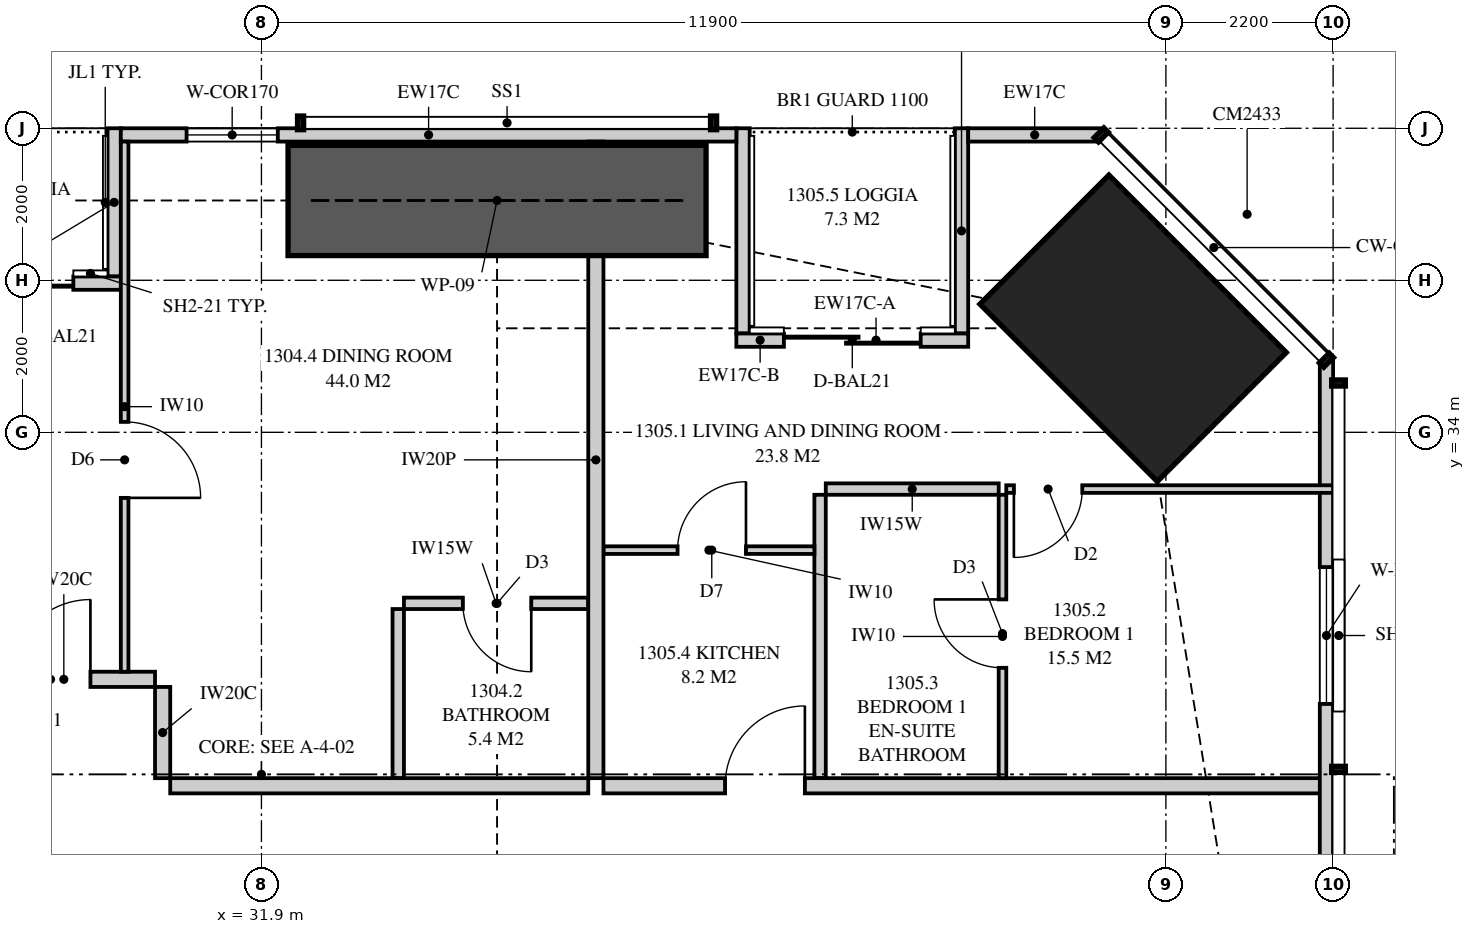
"""IFC4 building model, lengths in metres.
Left out: names, types, materials, properties, quantities, classifications, styles, units other than length and angle.
Written with IfcOpenShell. Run it as: python <this file> out.ifc"""

import sys

from ifc_helpers import new_model, si_unit, direction, frame, frame_2d, origin, origin_2d, place, context, subcontext, project, spatial, polyline, rectangle, outline, extrude, element, fill, save


model = new_model("IFC4")
c1 = context("Model", 3, precision=1e-05, world=origin(), true_north=direction((0.0, 1.0)))
c2 = subcontext(c1, "Body", "Model", "MODEL_VIEW")
j1 = project(units=[si_unit("LENGTHUNIT", "METRE"), si_unit("PLANEANGLEUNIT", "RADIAN")], contexts=[c1])
p1 = place(None, origin())
s1 = spatial("IfcSite", under=j1, at=p1, CompositionType="ELEMENT")
p2 = place(p1, origin())
s2 = spatial("IfcBuilding", under=s1, at=p2, CompositionType="ELEMENT")
p3 = place(p2, frame((0.0, 0.0, 51.15)))
s3 = spatial("IfcBuildingStorey", under=s2, at=p3, CompositionType="ELEMENT", Elevation=51.15)
p4 = place(p3, frame((43.369, 35.369, 0.0), z_axis=(0.0, 0.0, 1.0), x_axis=(-0.707106781187, -0.707106781187, 0.0)))
e1 = element("IfcColumn", 1, at=p4, inside=s3, PredefinedType="COLUMN", context=c2, shape_type="SweptSolid", body=[
    extrude(rectangle(XDim=2.4, YDim=3.3, at=origin_2d()), origin(), (0.0, 0.0, 1.0), 3.35),
])
p5 = place(p3, frame((45.913, 3.051, 0.0), z_axis=(0.0, 0.0, 1.0), x_axis=(0.0, 1.0, 0.0)))
e2 = element("IfcWall", 2, at=p5, inside=s3, PredefinedType="SOLIDWALL", context=c2, shape_type="SweptSolid", body=[
    extrude(outline(polyline([(0.0, 0.0), (31.897, 0.0), (31.897, 3.11), (22.167, 3.11), (22.167, 2.15), (22.074, 2.15), (22.074, 3.11), (21.949, 3.11), (21.949, 2.15), (9.949, 2.15), (9.949, 3.11), (9.823, 3.11), (9.823, 2.15), (9.73, 2.15), (9.73, 3.11), (0.0, 3.11), (0.0, 0.0)])), frame((0.0, 0.087, 0.0), z_axis=(0.0, -1.0, 0.0), x_axis=(1.0, 0.0, 0.0)), (0.0, 0.0, 1.0), 0.175),
])
p6 = place(p5, frame((2.222, 0.0, 0.4)))
e3 = element("IfcOpeningElement", 3, at=p6, cuts=e2, PredefinedType="OPENING", context=c2, shape_type="SweptSolid", body=[
    extrude(rectangle(XDim=1.8, YDim=1.7, at=frame_2d((0.9, 0.85))), frame((0.0, 0.097, 0.0), z_axis=(0.0, -1.0, 0.0), x_axis=(1.0, 0.0, 0.0)), (0.0, 0.0, 1.0), 0.195),
])
p7 = place(p5, frame((14.849, 0.0, 0.4)))
e4 = element("IfcOpeningElement", 4, at=p7, cuts=e2, PredefinedType="OPENING", context=c2, shape_type="SweptSolid", body=[
    extrude(rectangle(XDim=1.2, YDim=1.7, at=frame_2d((0.6, 0.85))), frame((0.0, 0.097, 0.0), z_axis=(0.0, -1.0, 0.0), x_axis=(1.0, 0.0, 0.0)), (0.0, 0.0, 1.0), 0.195),
])
p8 = place(p5, frame((27.375, 0.0, 0.4)))
e5 = element("IfcOpeningElement", 5, at=p8, cuts=e2, PredefinedType="OPENING", context=c2, shape_type="SweptSolid", body=[
    extrude(rectangle(XDim=1.8, YDim=1.7, at=frame_2d((0.9, 0.85))), frame((0.0, 0.097, 0.0), z_axis=(0.0, -1.0, 0.0), x_axis=(1.0, 0.0, 0.0)), (0.0, 0.0, 1.0), 0.195),
])
p9 = place(p3, frame((42.949, 37.913, 0.0), z_axis=(0.0, 0.0, 1.0), x_axis=(-1.0, 0.0, 0.0)))
e6 = element("IfcWall", 6, at=p9, inside=s3, PredefinedType="SOLIDWALL", context=c2, shape_type="SweptSolid", body=[
    extrude(rectangle(XDim=1.75, YDim=0.175, at=frame_2d((0.875, 0.0))), origin(), (0.0, 0.0, 1.0), 3.11),
])
p10 = place(p3, frame((38.149, 37.913, 0.0), z_axis=(0.0, 0.0, 1.0), x_axis=(-1.0, 0.0, 0.0)))
e7 = element("IfcWall", 7, at=p10, inside=s3, PredefinedType="SOLIDWALL", context=c2, shape_type="SweptSolid", body=[
    extrude(outline(polyline([(0.0, 0.0), (8.099, 0.0), (8.099, 2.15), (3.149, 2.15), (3.149, 3.11), (2.993, 3.11), (2.993, 2.15), (2.945, 2.15), (2.945, 3.11), (0.0, 3.11), (0.0, 0.0)])), frame((0.0, 0.087, 0.0), z_axis=(0.0, -1.0, 0.0), x_axis=(1.0, 0.0, 0.0)), (0.0, 0.0, 1.0), 0.175),
])
p11 = place(p10, frame((6.034, 0.0, 0.4)))
e8 = element("IfcOpeningElement", 8, at=p11, cuts=e7, PredefinedType="OPENING", context=c2, shape_type="SweptSolid", body=[
    extrude(rectangle(XDim=1.2, YDim=1.7, at=frame_2d((0.6, 0.85))), frame((0.0, 0.097, 0.0), z_axis=(0.0, -1.0, 0.0), x_axis=(1.0, 0.0, 0.0)), (0.0, 0.0, 1.0), 0.195),
])
p12 = place(p3, frame((41.199, 35.212, 0.0), z_axis=(0.0, 0.0, 1.0), x_axis=(-1.0, 0.0, 0.0)))
e9 = element("IfcWall", 9, at=p12, inside=s3, PredefinedType="SOLIDWALL", context=c2, shape_type="SweptSolid", body=[
    extrude(rectangle(XDim=2.425, YDim=0.175, at=frame_2d((1.212, 0.0))), origin(), (0.0, 0.0, 1.0), 2.15),
])
p13 = place(p12, frame((0.625, 0.0, 0.0)))
e10 = element("IfcOpeningElement", 10, at=p13, cuts=e9, PredefinedType="OPENING", context=c2, shape_type="SweptSolid", body=[
    extrude(rectangle(XDim=1.8, YDim=2.1, at=frame_2d((0.9, 1.05))), frame((0.0, 0.097, 0.0), z_axis=(0.0, -1.0, 0.0), x_axis=(1.0, 0.0, 0.0)), (0.0, 0.0, 1.0), 0.195),
])
p14 = place(p3, frame((38.774, 35.212, 0.0), z_axis=(0.0, 0.0, 1.0), x_axis=(-1.0, 0.0, 0.0)))
e11 = element("IfcWall", 11, at=p14, inside=s3, PredefinedType="SOLIDWALL", context=c2, shape_type="SweptSolid", body=[
    extrude(rectangle(XDim=0.625, YDim=0.175, at=frame_2d((0.312, 0.0))), origin(), (0.0, 0.0, 1.0), 2.51),
])
p15 = place(p3, frame((41.111, 38.0, 0.0), z_axis=(0.0, 0.0, 1.0), x_axis=(0.0, -1.0, 0.0)))
e12 = element("IfcWall", 12, at=p15, inside=s3, PredefinedType="SOLIDWALL", context=c2, shape_type="SweptSolid", body=[
    extrude(outline(polyline([(0.0, 0.0), (2.7, 0.0), (2.7, 2.15), (1.344, 2.15), (1.344, 3.11), (0.0, 3.11), (0.0, 0.0)])), frame((0.0, 0.087, 0.0), z_axis=(0.0, -1.0, 0.0), x_axis=(1.0, 0.0, 0.0)), (0.0, 0.0, 1.0), 0.175),
])
p16 = place(p3, frame((38.236, 38.0, 0.0), z_axis=(0.0, 0.0, 1.0), x_axis=(0.0, -1.0, 0.0)))
e13 = element("IfcWall", 13, at=p16, inside=s3, PredefinedType="SOLIDWALL", context=c2, shape_type="SweptSolid", body=[
    extrude(outline(polyline([(0.0, 0.0), (2.7, 0.0), (2.7, 2.51), (2.434, 2.51), (2.434, 2.15), (0.767, 2.15), (0.767, 3.11), (0.0, 3.11), (0.0, 0.0)])), frame((0.0, 0.087, 0.0), z_axis=(0.0, -1.0, 0.0), x_axis=(1.0, 0.0, 0.0)), (0.0, 0.0, 1.0), 0.175),
])
p17 = place(p3, frame((30.05, 35.962, 0.0), z_axis=(0.0, 0.0, 1.0), x_axis=(-1.0, 0.0, 0.0)))
e14 = element("IfcWall", 14, at=p17, inside=s3, PredefinedType="SOLIDWALL", context=c2, shape_type="SweptSolid", body=[
    extrude(rectangle(XDim=3.05, YDim=0.175, at=frame_2d((1.525, 0.0))), origin(), (0.0, 0.0, 1.0), 3.11),
])
p18 = place(p17, frame((0.625, 0.0, 0.0)))
e15 = element("IfcOpeningElement", 15, at=p18, cuts=e14, PredefinedType="OPENING", context=c2, shape_type="SweptSolid", body=[
    extrude(rectangle(XDim=1.8, YDim=2.1, at=frame_2d((0.9, 1.05))), frame((0.0, 0.097, 0.0), z_axis=(0.0, -1.0, 0.0), x_axis=(1.0, 0.0, 0.0)), (0.0, 0.0, 1.0), 0.195),
])
p19 = place(p3, frame((29.962, 38.0, 0.0), z_axis=(0.0, 0.0, 1.0), x_axis=(0.0, -1.0, 0.0)))
e16 = element("IfcWall", 16, at=p19, inside=s3, PredefinedType="SOLIDWALL", context=c2, shape_type="SweptSolid", body=[
    extrude(outline(polyline([(0.0, 0.0), (1.95, 0.0), (1.95, 3.11), (1.75, 3.11), (1.75, 2.15), (0.15, 2.15), (0.15, 3.11), (0.0, 3.11), (0.0, 0.0)])), frame((0.0, 0.087, 0.0), z_axis=(0.0, -1.0, 0.0), x_axis=(1.0, 0.0, 0.0)), (0.0, 0.0, 1.0), 0.175),
])
p20 = place(p3, frame((36.3, 37.825, 0.0), z_axis=(0.0, 0.0, 1.0), x_axis=(0.0, -1.0, 0.0)))
e17 = element("IfcWall", 17, at=p20, inside=s3, PredefinedType="PARTITIONING", context=c2, shape_type="SweptSolid", body=[
    extrude(outline(polyline([(0.108, 3.11), (0.0, 3.11), (0.0, 0.0), (0.529, 0.0), (0.529, 0.615), (1.021, 0.615), (1.021, 0.0), (8.375, 0.0), (8.375, 3.11), (3.766, 3.11), (3.766, 2.51), (1.964, 2.51), (1.964, 2.15), (1.021, 2.15), (1.021, 1.535), (0.529, 1.535), (0.529, 2.15), (0.108, 2.15), (0.108, 3.11)])), frame((0.0, 0.1, 0.0), z_axis=(0.0, -1.0, 0.0), x_axis=(1.0, 0.0, 0.0)), (0.0, 0.0, 1.0), 0.2),
])
p21 = place(p3, frame((33.775, 31.75, 0.0), z_axis=(0.0, 0.0, 1.0), x_axis=(1.0, 0.0, 0.0)))
e18 = element("IfcWall", 18, at=p21, inside=s3, PredefinedType="PLUMBINGWALL", context=c2, shape_type="SweptSolid", body=[
    extrude(outline(polyline([(0.0, 0.0), (2.425, 0.0), (2.425, 3.11), (1.537, 3.11), (1.537, 2.541), (0.913, 2.541), (0.913, 3.11), (0.0, 3.11), (0.0, 0.0)])), frame((0.0, 0.075, 0.0), z_axis=(0.0, -1.0, 0.0), x_axis=(1.0, 0.0, 0.0)), (0.0, 0.0, 1.0), 0.15),
])
p22 = place(p21, frame((0.775, 0.0, 0.0)))
e19 = element("IfcOpeningElement", 19, at=p22, cuts=e18, PredefinedType="OPENING", context=c2, shape_type="SweptSolid", body=[
    extrude(rectangle(XDim=0.9, YDim=2.1, at=frame_2d((0.45, 1.05))), frame((0.0, 0.085, 0.0), z_axis=(0.0, -1.0, 0.0), x_axis=(1.0, 0.0, 0.0)), (0.0, 0.0, 1.0), 0.17),
])
p23 = place(p3, frame((33.7, 31.675, 0.0), z_axis=(0.0, 0.0, 1.0), x_axis=(0.0, -1.0, 0.0)))
e20 = element("IfcWall", 20, at=p23, inside=s3, PredefinedType="PLUMBINGWALL", context=c2, shape_type="SweptSolid", body=[
    extrude(rectangle(XDim=2.225, YDim=0.15, at=frame_2d((1.113, 0.0))), origin(), (0.0, 0.0, 1.0), 3.11),
])
p24 = place(p3, frame((30.1, 37.825, 0.0), z_axis=(0.0, 0.0, 1.0), x_axis=(0.0, -1.0, 0.0)))
e21 = element("IfcWall", 21, at=p24, inside=s3, PredefinedType="PARTITIONING", context=c2, shape_type="SweptSolid", body=[
    extrude(outline(polyline([(0.0, 0.0), (6.975, 0.0), (6.975, 3.11), (1.635, 3.11), (1.635, 2.15), (0.0, 2.15), (0.0, 3.11), (0.0, 0.0)])), frame((0.0, 0.05, 0.0), z_axis=(0.0, -1.0, 0.0), x_axis=(1.0, 0.0, 0.0)), (0.0, 0.0, 1.0), 0.1),
])
p25 = place(p24, frame((3.688, 0.0, 0.0)))
e22 = element("IfcOpeningElement", 22, at=p25, cuts=e21, PredefinedType="OPENING", context=c2, shape_type="SweptSolid", body=[
    extrude(rectangle(XDim=1.0, YDim=2.1, at=frame_2d((0.5, 1.05))), frame((0.0, 0.06, 0.0), z_axis=(0.0, -1.0, 0.0), x_axis=(1.0, 0.0, 0.0)), (0.0, 0.0, 1.0), 0.12),
])
p26 = place(p3, frame((36.4, 29.35, 0.0), z_axis=(0.0, 0.0, 1.0), x_axis=(1.0, 0.0, 0.0)))
e23 = element("IfcWall", 23, at=p26, inside=s3, PredefinedType="PARTITIONING", context=c2, shape_type="SweptSolid", body=[
    extrude(outline(polyline([(0.0, 0.0), (9.6, 0.0), (9.6, 3.11), (8.866, 3.11), (8.866, 2.15), (7.023, 2.15), (7.023, 3.11), (0.0, 3.11), (0.0, 0.0)])), frame((0.0, 0.1, 0.0), z_axis=(0.0, -1.0, 0.0), x_axis=(1.0, 0.0, 0.0)), (0.0, 0.0, 1.0), 0.2),
])
p27 = place(p26, frame((1.6, 0.0, 0.0)))
e24 = element("IfcOpeningElement", 24, at=p27, cuts=e23, PredefinedType="OPENING", context=c2, shape_type="SweptSolid", body=[
    extrude(rectangle(XDim=1.05, YDim=2.2, at=frame_2d((0.525, 1.1))), frame((0.0, 0.11, 0.0), z_axis=(0.0, -1.0, 0.0), x_axis=(1.0, 0.0, 0.0)), (0.0, 0.0, 1.0), 0.22),
])
p28 = place(p3, frame((41.65, 33.178, 0.0), z_axis=(0.0, 0.0, 1.0), x_axis=(0.0, -1.0, 0.0)))
e25 = element("IfcWall", 25, at=p28, inside=s3, PredefinedType="PARTITIONING", context=c2, shape_type="SweptSolid", body=[
    extrude(rectangle(XDim=3.728, YDim=0.1, at=frame_2d((1.864, 0.0))), origin(), (0.0, 0.0, 1.0), 3.11),
])
p29 = place(p28, frame((1.377, 0.0, 0.0)))
e26 = element("IfcOpeningElement", 26, at=p29, cuts=e25, PredefinedType="OPENING", context=c2, shape_type="SweptSolid", body=[
    extrude(rectangle(XDim=0.9, YDim=2.1, at=frame_2d((0.45, 1.05))), frame((0.0, 0.06, 0.0), z_axis=(0.0, -1.0, 0.0), x_axis=(1.0, 0.0, 0.0)), (0.0, 0.0, 1.0), 0.12),
])
p30 = place(p3, frame((41.7, 33.253, 0.0), z_axis=(0.0, 0.0, 1.0), x_axis=(1.0, 0.0, 0.0)))
e27 = element("IfcWall", 27, at=p30, inside=s3, PredefinedType="PARTITIONING", context=c2, shape_type="SweptSolid", body=[
    extrude(outline(polyline([(0.0, 0.0), (4.3, 0.0), (4.3, 3.11), (2.883, 3.11), (2.883, 2.15), (1.14, 2.15), (1.14, 3.11), (0.0, 3.11), (0.0, 0.0)])), frame((0.0, 0.05, 0.0), z_axis=(0.0, -1.0, 0.0), x_axis=(1.0, 0.0, 0.0)), (0.0, 0.0, 1.0), 0.1),
])
p31 = place(p30, frame((0.1, 0.0, 0.0)))
e28 = element("IfcOpeningElement", 28, at=p31, cuts=e27, PredefinedType="OPENING", context=c2, shape_type="SweptSolid", body=[
    extrude(rectangle(XDim=0.9, YDim=2.1, at=frame_2d((0.45, 1.05))), frame((0.0, 0.06, 0.0), z_axis=(0.0, -1.0, 0.0), x_axis=(1.0, 0.0, 0.0)), (0.0, 0.0, 1.0), 0.12),
])
p32 = place(p3, frame((39.325, 33.253, 0.0), z_axis=(0.0, 0.0, 1.0), x_axis=(1.0, 0.0, 0.0)))
e29 = element("IfcWall", 29, at=p32, inside=s3, PredefinedType="PLUMBINGWALL", context=c2, shape_type="SweptSolid", body=[
    extrude(rectangle(XDim=2.275, YDim=0.15, at=frame_2d((1.138, 0.0))), origin(), (0.0, 0.0, 1.0), 3.11),
])
p33 = place(p3, frame((39.25, 33.178, 0.0), z_axis=(0.0, 0.0, 1.0), x_axis=(0.0, -1.0, 0.0)))
e30 = element("IfcWall", 30, at=p33, inside=s3, PredefinedType="PLUMBINGWALL", context=c2, shape_type="SweptSolid", body=[
    extrude(rectangle(XDim=3.728, YDim=0.15, at=frame_2d((1.864, 0.0))), origin(), (0.0, 0.0, 1.0), 3.11),
])
p34 = place(p3, frame((36.4, 32.45, 0.0), z_axis=(0.0, 0.0, 1.0), x_axis=(1.0, 0.0, 0.0)))
e31 = element("IfcWall", 31, at=p34, inside=s3, PredefinedType="PARTITIONING", context=c2, shape_type="SweptSolid", body=[
    extrude(rectangle(XDim=2.775, YDim=0.1, at=frame_2d((1.388, 0.0))), origin(), (0.0, 0.0, 1.0), 3.11),
])
p35 = place(p34, frame((0.975, 0.0, 0.0)))
e32 = element("IfcOpeningElement", 32, at=p35, cuts=e31, PredefinedType="OPENING", context=c2, shape_type="SweptSolid", body=[
    extrude(rectangle(XDim=0.9, YDim=2.1, at=frame_2d((0.45, 1.05))), frame((0.0, 0.06, 0.0), z_axis=(0.0, -1.0, 0.0), x_axis=(1.0, 0.0, 0.0)), (0.0, 0.0, 1.0), 0.12),
])
p36 = place(p3, frame((30.7, 29.35, 0.0), z_axis=(0.0, 0.0, 1.0), x_axis=(1.0, 0.0, 0.0)))
e33 = element("IfcWall", 33, at=p36, inside=s3, PredefinedType="PARTITIONING", context=c2, shape_type="SweptSolid", body=[
    extrude(outline(polyline([(0.0, 0.0), (5.5, 0.0), (5.5, 3.11), (4.637, 3.11), (4.637, 2.541), (3.963, 2.541), (3.963, 3.11), (0.0, 3.11), (0.0, 0.0)])), frame((0.0, 0.1, 0.0), z_axis=(0.0, -1.0, 0.0), x_axis=(1.0, 0.0, 0.0)), (0.0, 0.0, 1.0), 0.2),
])
p37 = place(p3, frame((28.1, 30.75, 0.0), z_axis=(0.0, 0.0, 1.0), x_axis=(1.0, 0.0, 0.0)))
e34 = element("IfcWall", 34, at=p37, inside=s3, PredefinedType="PARTITIONING", context=c2, shape_type="SweptSolid", body=[
    extrude(rectangle(XDim=2.4, YDim=0.2, at=frame_2d((1.2, 0.0))), origin(), (0.0, 0.0, 1.0), 3.11),
])
p38 = place(p37, frame((0.5, 0.0, 0.0)))
e35 = element("IfcOpeningElement", 35, at=p38, cuts=e34, PredefinedType="OPENING", context=c2, shape_type="SweptSolid", body=[
    extrude(rectangle(XDim=1.05, YDim=2.2, at=frame_2d((0.525, 1.1))), frame((0.0, 0.11, 0.0), z_axis=(0.0, -1.0, 0.0), x_axis=(1.0, 0.0, 0.0)), (0.0, 0.0, 1.0), 0.22),
])
p39 = place(p3, frame((30.6, 29.45, 0.0), z_axis=(0.0, 0.0, 1.0), x_axis=(0.0, 1.0, 0.0)))
e36 = element("IfcWall", 36, at=p39, inside=s3, PredefinedType="PARTITIONING", context=c2, shape_type="SweptSolid", body=[
    extrude(rectangle(XDim=1.2, YDim=0.2, at=frame_2d((0.6, 0.0))), origin(), (0.0, 0.0, 1.0), 3.11),
])
p40 = place(p3, frame((32.25, 37.05, 0.0), z_axis=(0.0, 0.0, 1.0), x_axis=(1.0, 0.0, 0.0)))
e37 = element("IfcWall", 37, at=p40, inside=s3, PredefinedType="SHEAR", context=c2, shape_type="SweptSolid", body=[
    extrude(rectangle(XDim=5.5, YDim=1.45, at=frame_2d((2.75, 0.0))), origin(), (0.0, 0.0, 1.0), 3.35),
])
p41 = place(p8, origin())
e38 = element("IfcWindow", 38, at=p41, inside=s3, PartitioningType="SINGLE_PANEL", PredefinedType="WINDOW", context=c2, shape_type="SweptSolid", body=[
    extrude(rectangle(XDim=1.8, YDim=1.7, at=frame_2d((0.9, 0.85))), frame((0.0, 0.03, 0.0), z_axis=(0.0, -1.0, 0.0), x_axis=(1.0, 0.0, 0.0)), (0.0, 0.0, 1.0), 0.06),
])
fill(e5, e38)
p42 = place(p13, origin())
e39 = element("IfcDoor", 39, at=p42, inside=s3, OperationType="SLIDING_TO_LEFT", PredefinedType="DOOR", context=c2, shape_type="SweptSolid", body=[
    extrude(rectangle(XDim=1.8, YDim=2.1, at=frame_2d((0.9, 1.05))), frame((0.0, 0.025, 0.0), z_axis=(0.0, -1.0, 0.0), x_axis=(1.0, 0.0, 0.0)), (0.0, 0.0, 1.0), 0.05),
])
fill(e10, e39)
p43 = place(p11, origin())
e40 = element("IfcWindow", 40, at=p43, inside=s3, PartitioningType="SINGLE_PANEL", PredefinedType="WINDOW", context=c2, shape_type="SweptSolid", body=[
    extrude(rectangle(XDim=1.2, YDim=1.7, at=frame_2d((0.6, 0.85))), frame((0.0, 0.03, 0.0), z_axis=(0.0, -1.0, 0.0), x_axis=(1.0, 0.0, 0.0)), (0.0, 0.0, 1.0), 0.06),
])
fill(e8, e40)
p44 = place(p18, origin())
e41 = element("IfcDoor", 41, at=p44, inside=s3, OperationType="SLIDING_TO_LEFT", PredefinedType="DOOR", context=c2, shape_type="SweptSolid", body=[
    extrude(rectangle(XDim=1.8, YDim=2.1, at=frame_2d((0.9, 1.05))), frame((0.0, 0.025, 0.0), z_axis=(0.0, -1.0, 0.0), x_axis=(1.0, 0.0, 0.0)), (0.0, 0.0, 1.0), 0.05),
])
fill(e15, e41)
p45 = place(p38, origin())
e42 = element("IfcDoor", 42, at=p45, inside=s3, OperationType="SINGLE_SWING_RIGHT", PredefinedType="DOOR", context=c2, shape_type="SweptSolid", body=[
    extrude(rectangle(XDim=1.05, YDim=2.2, at=frame_2d((0.525, 1.1))), frame((0.0, 0.025, 0.0), z_axis=(0.0, -1.0, 0.0), x_axis=(1.0, 0.0, 0.0)), (0.0, 0.0, 1.0), 0.05),
])
fill(e35, e42)
p46 = place(p22, frame((0.9, 0.0, 0.0), z_axis=(0.0, 0.0, 1.0), x_axis=(-1.0, 0.0, 0.0)))
e43 = element("IfcDoor", 43, at=p46, inside=s3, OperationType="SINGLE_SWING_LEFT", PredefinedType="DOOR", context=c2, shape_type="SweptSolid", body=[
    extrude(rectangle(XDim=0.9, YDim=2.1, at=frame_2d((0.45, 1.05))), frame((0.0, 0.025, 0.0), z_axis=(0.0, -1.0, 0.0), x_axis=(1.0, 0.0, 0.0)), (0.0, 0.0, 1.0), 0.05),
])
fill(e19, e43)
p47 = place(p25, origin())
e44 = element("IfcDoor", 44, at=p47, inside=s3, OperationType="SINGLE_SWING_RIGHT", PredefinedType="DOOR", context=c2, shape_type="SweptSolid", body=[
    extrude(rectangle(XDim=1.0, YDim=2.1, at=frame_2d((0.5, 1.05))), frame((0.0, 0.025, 0.0), z_axis=(0.0, -1.0, 0.0), x_axis=(1.0, 0.0, 0.0)), (0.0, 0.0, 1.0), 0.05),
])
fill(e22, e44)
p48 = place(p27, origin())
e45 = element("IfcDoor", 45, at=p48, inside=s3, OperationType="SINGLE_SWING_RIGHT", PredefinedType="DOOR", context=c2, shape_type="SweptSolid", body=[
    extrude(rectangle(XDim=1.05, YDim=2.2, at=frame_2d((0.525, 1.1))), frame((0.0, 0.025, 0.0), z_axis=(0.0, -1.0, 0.0), x_axis=(1.0, 0.0, 0.0)), (0.0, 0.0, 1.0), 0.05),
])
fill(e24, e45)
p49 = place(p31, frame((0.9, 0.0, 0.0), z_axis=(0.0, 0.0, 1.0), x_axis=(-1.0, 0.0, 0.0)))
e46 = element("IfcDoor", 46, at=p49, inside=s3, OperationType="SINGLE_SWING_RIGHT", PredefinedType="DOOR", context=c2, shape_type="SweptSolid", body=[
    extrude(rectangle(XDim=0.9, YDim=2.1, at=frame_2d((0.45, 1.05))), frame((0.0, 0.025, 0.0), z_axis=(0.0, -1.0, 0.0), x_axis=(1.0, 0.0, 0.0)), (0.0, 0.0, 1.0), 0.05),
])
fill(e28, e46)
p50 = place(p29, frame((0.9, 0.0, 0.0), z_axis=(0.0, 0.0, 1.0), x_axis=(-1.0, 0.0, 0.0)))
e47 = element("IfcDoor", 47, at=p50, inside=s3, OperationType="SINGLE_SWING_RIGHT", PredefinedType="DOOR", context=c2, shape_type="SweptSolid", body=[
    extrude(rectangle(XDim=0.9, YDim=2.1, at=frame_2d((0.45, 1.05))), frame((0.0, 0.025, 0.0), z_axis=(0.0, -1.0, 0.0), x_axis=(1.0, 0.0, 0.0)), (0.0, 0.0, 1.0), 0.05),
])
fill(e26, e47)
p51 = place(p35, origin())
e48 = element("IfcDoor", 48, at=p51, inside=s3, OperationType="SINGLE_SWING_RIGHT", PredefinedType="DOOR", context=c2, shape_type="SweptSolid", body=[
    extrude(rectangle(XDim=0.9, YDim=2.1, at=frame_2d((0.45, 1.05))), frame((0.0, 0.025, 0.0), z_axis=(0.0, -1.0, 0.0), x_axis=(1.0, 0.0, 0.0)), (0.0, 0.0, 1.0), 0.05),
])
fill(e32, e48)
save(model, sys.argv[1])
